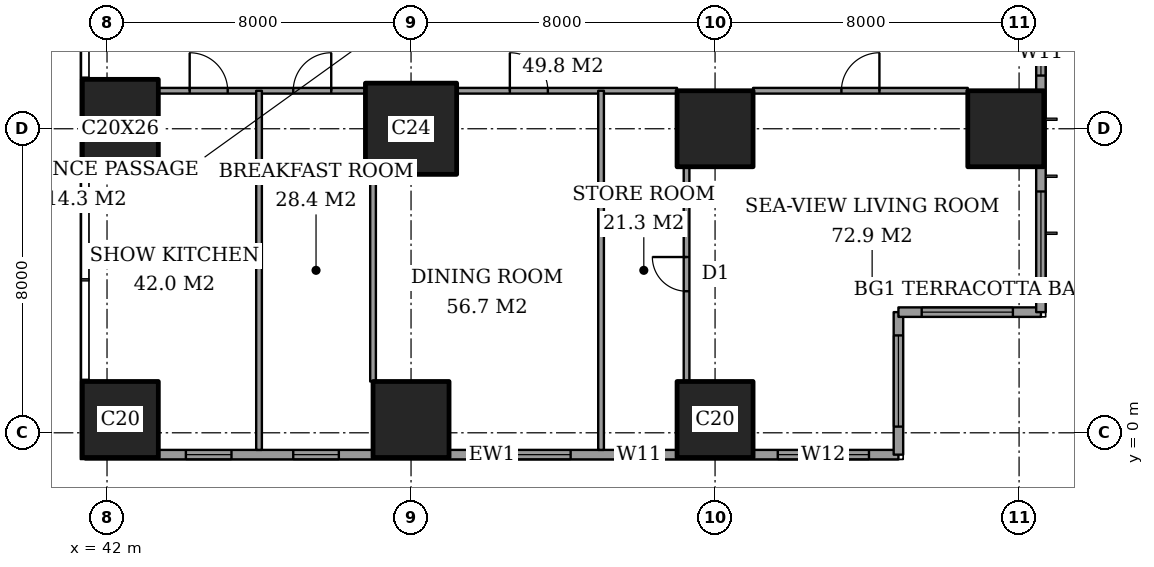
"""IFC4 building model, lengths in metres.
Left out: names, types, materials, properties, quantities, classifications, styles, units other than length and angle.
Written with IfcOpenShell. Run it as: python <this file> out.ifc"""

import sys

from ifc_helpers import new_model, si_unit, direction, frame, frame_2d, origin, origin_2d, place, context, subcontext, project, spatial, rectangle, extrude, element, fill, save


model = new_model("IFC4")
c1 = context("Model", 3, precision=1e-05, world=origin(), true_north=direction((0.0, 1.0)))
c2 = subcontext(c1, "Body", "Model", "MODEL_VIEW")
j1 = project(units=[si_unit("LENGTHUNIT", "METRE"), si_unit("PLANEANGLEUNIT", "RADIAN")], contexts=[c1])
p1 = place(None, origin())
s1 = spatial("IfcSite", under=j1, at=p1, CompositionType="ELEMENT")
p2 = place(p1, origin())
s2 = spatial("IfcBuilding", under=s1, at=p2, CompositionType="ELEMENT")
p3 = place(p2, frame((0.0, 0.0, 153.8)))
s3 = spatial("IfcBuildingStorey", under=s2, at=p3, CompositionType="ELEMENT", Elevation=153.8)
p4 = place(p3, frame((42.35, 0.35, 0.0), z_axis=(0.0, 0.0, 1.0), x_axis=(1.0, 0.0, 0.0)))
e1 = element("IfcColumn", 1, at=p4, inside=s3, PredefinedType="COLUMN", context=c2, shape_type="SweptSolid", body=[
    extrude(rectangle(XDim=2.0, YDim=2.0, at=origin_2d()), origin(), (0.0, 0.0, 1.0), 3.6),
])
p5 = place(p3, frame((42.35, 8.0, 0.0), z_axis=(0.0, 0.0, 1.0), x_axis=(1.0, 0.0, 0.0)))
e2 = element("IfcColumn", 2, at=p5, inside=s3, PredefinedType="COLUMN", context=c2, shape_type="SweptSolid", body=[
    extrude(rectangle(XDim=2.0, YDim=2.6, at=origin_2d()), origin(), (0.0, 0.0, 1.0), 3.6),
])
p6 = place(p3, frame((50.0, 0.35, 0.0), z_axis=(0.0, 0.0, 1.0), x_axis=(1.0, 0.0, 0.0)))
e3 = element("IfcColumn", 3, at=p6, inside=s3, PredefinedType="COLUMN", context=c2, shape_type="SweptSolid", body=[
    extrude(rectangle(XDim=2.0, YDim=2.0, at=origin_2d()), origin(), (0.0, 0.0, 1.0), 3.6),
])
p7 = place(p3, frame((50.0, 8.0, 0.0), z_axis=(0.0, 0.0, 1.0), x_axis=(1.0, 0.0, 0.0)))
e4 = element("IfcColumn", 4, at=p7, inside=s3, PredefinedType="COLUMN", context=c2, shape_type="SweptSolid", body=[
    extrude(rectangle(XDim=2.4, YDim=2.4, at=origin_2d()), origin(), (0.0, 0.0, 1.0), 3.6),
])
for number, where, z_axis, x_axis in (
    (5, (58.0, 0.35, 0.0), (0.0, 0.0, 1.0), (1.0, 0.0, 0.0)),
    (6, (58.0, 8.0, 0.0), (0.0, 0.0, 1.0), (1.0, 0.0, 0.0)),
    (7, (65.65, 8.0, 0.0), (0.0, 0.0, 1.0), (1.0, 0.0, 0.0)),
):
    element("IfcColumn", number, at=place(p3, frame(where, z_axis=z_axis, x_axis=x_axis)), inside=s3, PredefinedType="COLUMN", context=c2, shape_type="SweptSolid", body=[
        extrude(rectangle(XDim=2.0, YDim=2.0, at=origin_2d()), origin(), (0.0, 0.0, 1.0), 3.6),
    ])
p8 = place(p3, frame((41.425, -0.575, 0.0), z_axis=(0.0, 0.0, 1.0), x_axis=(1.0, 0.0, 0.0)))
e8 = element("IfcWall", 8, at=p8, inside=s3, PredefinedType="SOLIDWALL", context=c2, shape_type="SweptSolid", body=[
    extrude(rectangle(XDim=21.4, YDim=0.25, at=frame_2d((10.7, 0.0))), origin(), (0.0, 0.0, 1.0), 3.6),
])
p9 = place(p8, frame((2.65, 0.0, 0.4)))
e9 = element("IfcOpeningElement", 9, at=p9, cuts=e8, PredefinedType="OPENING", context=c2, shape_type="SweptSolid", body=[
    extrude(rectangle(XDim=1.2, YDim=2.2, at=frame_2d((0.6, 1.1))), frame((0.0, 0.135, 0.0), z_axis=(0.0, -1.0, 0.0), x_axis=(1.0, 0.0, 0.0)), (0.0, 0.0, 1.0), 0.27),
])
p10 = place(p8, frame((5.475, 0.0, 0.4)))
e10 = element("IfcOpeningElement", 10, at=p10, cuts=e8, PredefinedType="OPENING", context=c2, shape_type="SweptSolid", body=[
    extrude(rectangle(XDim=1.2, YDim=2.2, at=frame_2d((0.6, 1.1))), frame((0.0, 0.135, 0.0), z_axis=(0.0, -1.0, 0.0), x_axis=(1.0, 0.0, 0.0)), (0.0, 0.0, 1.0), 0.27),
])
p11 = place(p8, frame((10.375, 0.0, 0.4)))
e11 = element("IfcOpeningElement", 11, at=p11, cuts=e8, PredefinedType="OPENING", context=c2, shape_type="SweptSolid", body=[
    extrude(rectangle(XDim=2.4, YDim=2.2, at=frame_2d((1.2, 1.1))), frame((0.0, 0.135, 0.0), z_axis=(0.0, -1.0, 0.0), x_axis=(1.0, 0.0, 0.0)), (0.0, 0.0, 1.0), 0.27),
])
p12 = place(p8, frame((13.975, 0.0, 0.4)))
e12 = element("IfcOpeningElement", 12, at=p12, cuts=e8, PredefinedType="OPENING", context=c2, shape_type="SweptSolid", body=[
    extrude(rectangle(XDim=1.2, YDim=2.2, at=frame_2d((0.6, 1.1))), frame((0.0, 0.135, 0.0), z_axis=(0.0, -1.0, 0.0), x_axis=(1.0, 0.0, 0.0)), (0.0, 0.0, 1.0), 0.27),
])
p13 = place(p8, frame((18.225, 0.0, 0.4)))
e13 = element("IfcOpeningElement", 13, at=p13, cuts=e8, PredefinedType="OPENING", context=c2, shape_type="SweptSolid", body=[
    extrude(rectangle(XDim=2.4, YDim=2.2, at=frame_2d((1.2, 1.1))), frame((0.0, 0.135, 0.0), z_axis=(0.0, -1.0, 0.0), x_axis=(1.0, 0.0, 0.0)), (0.0, 0.0, 1.0), 0.27),
])
p14 = place(p3, frame((62.825, -0.575, 0.0), z_axis=(0.0, 0.0, 1.0), x_axis=(0.0, 1.0, 0.0)))
e14 = element("IfcWall", 14, at=p14, inside=s3, PredefinedType="SOLIDWALL", context=c2, shape_type="SweptSolid", body=[
    extrude(rectangle(XDim=3.75, YDim=0.25, at=frame_2d((1.875, 0.0))), origin(), (0.0, 0.0, 1.0), 3.6),
])
p15 = place(p14, frame((0.738, 0.0, 0.4)))
e15 = element("IfcOpeningElement", 15, at=p15, cuts=e14, PredefinedType="OPENING", context=c2, shape_type="SweptSolid", body=[
    extrude(rectangle(XDim=2.4, YDim=2.2, at=frame_2d((1.2, 1.1))), frame((0.0, 0.135, 0.0), z_axis=(0.0, -1.0, 0.0), x_axis=(1.0, 0.0, 0.0)), (0.0, 0.0, 1.0), 0.27),
])
p16 = place(p3, frame((62.825, 3.175, 0.0), z_axis=(0.0, 0.0, 1.0), x_axis=(1.0, 0.0, 0.0)))
e16 = element("IfcWall", 16, at=p16, inside=s3, PredefinedType="SOLIDWALL", context=c2, shape_type="SweptSolid", body=[
    extrude(rectangle(XDim=3.75, YDim=0.25, at=frame_2d((1.875, 0.0))), origin(), (0.0, 0.0, 1.0), 3.6),
])
p17 = place(p16, frame((0.613, 0.0, 0.4)))
e17 = element("IfcOpeningElement", 17, at=p17, cuts=e16, PredefinedType="OPENING", context=c2, shape_type="SweptSolid", body=[
    extrude(rectangle(XDim=2.4, YDim=2.2, at=frame_2d((1.2, 1.1))), frame((0.0, 0.135, 0.0), z_axis=(0.0, -1.0, 0.0), x_axis=(1.0, 0.0, 0.0)), (0.0, 0.0, 1.0), 0.27),
])
p18 = place(p3, frame((66.575, 3.175, 0.0), z_axis=(0.0, 0.0, 1.0), x_axis=(0.0, 1.0, 0.0)))
e18 = element("IfcWall", 18, at=p18, inside=s3, PredefinedType="SOLIDWALL", context=c2, shape_type="SweptSolid", body=[
    extrude(rectangle(XDim=41.65, YDim=0.25, at=frame_2d((20.825, 0.0))), origin(), (0.0, 0.0, 1.0), 3.6),
])
p19 = place(p18, frame((0.775, 0.0, 0.4)))
e19 = element("IfcOpeningElement", 19, at=p19, cuts=e18, PredefinedType="OPENING", context=c2, shape_type="SweptSolid", body=[
    extrude(rectangle(XDim=2.4, YDim=2.2, at=frame_2d((1.2, 1.1))), frame((0.0, 0.135, 0.0), z_axis=(0.0, -1.0, 0.0), x_axis=(1.0, 0.0, 0.0)), (0.0, 0.0, 1.0), 0.27),
])
p20 = place(p18, frame((6.225, 0.0, 0.4)))
e20 = element("IfcOpeningElement", 20, at=p20, cuts=e18, PredefinedType="OPENING", context=c2, shape_type="SweptSolid", body=[
    extrude(rectangle(XDim=1.2, YDim=2.2, at=frame_2d((0.6, 1.1))), frame((0.0, 0.135, 0.0), z_axis=(0.0, -1.0, 0.0), x_axis=(1.0, 0.0, 0.0)), (0.0, 0.0, 1.0), 0.27),
])
p21 = place(p18, frame((8.475, 0.0, 0.4)))
e21 = element("IfcOpeningElement", 21, at=p21, cuts=e18, PredefinedType="OPENING", context=c2, shape_type="SweptSolid", body=[
    extrude(rectangle(XDim=2.4, YDim=2.2, at=frame_2d((1.2, 1.1))), frame((0.0, 0.135, 0.0), z_axis=(0.0, -1.0, 0.0), x_axis=(1.0, 0.0, 0.0)), (0.0, 0.0, 1.0), 0.27),
])
p22 = place(p18, frame((15.775, 0.0, 0.4)))
e22 = element("IfcOpeningElement", 22, at=p22, cuts=e18, PredefinedType="OPENING", context=c2, shape_type="SweptSolid", body=[
    extrude(rectangle(XDim=2.4, YDim=2.2, at=frame_2d((1.2, 1.1))), frame((0.0, 0.135, 0.0), z_axis=(0.0, -1.0, 0.0), x_axis=(1.0, 0.0, 0.0)), (0.0, 0.0, 1.0), 0.27),
])
p23 = place(p18, frame((23.475, 0.0, 0.4)))
e23 = element("IfcOpeningElement", 23, at=p23, cuts=e18, PredefinedType="OPENING", context=c2, shape_type="SweptSolid", body=[
    extrude(rectangle(XDim=2.4, YDim=2.2, at=frame_2d((1.2, 1.1))), frame((0.0, 0.135, 0.0), z_axis=(0.0, -1.0, 0.0), x_axis=(1.0, 0.0, 0.0)), (0.0, 0.0, 1.0), 0.27),
])
p24 = place(p18, frame((30.975, 0.0, 0.4)))
e24 = element("IfcOpeningElement", 24, at=p24, cuts=e18, PredefinedType="OPENING", context=c2, shape_type="SweptSolid", body=[
    extrude(rectangle(XDim=2.4, YDim=2.2, at=frame_2d((1.2, 1.1))), frame((0.0, 0.135, 0.0), z_axis=(0.0, -1.0, 0.0), x_axis=(1.0, 0.0, 0.0)), (0.0, 0.0, 1.0), 0.27),
])
p25 = place(p18, frame((34.5, 0.0, 0.4)))
e25 = element("IfcOpeningElement", 25, at=p25, cuts=e18, PredefinedType="OPENING", context=c2, shape_type="SweptSolid", body=[
    extrude(rectangle(XDim=1.2, YDim=2.2, at=frame_2d((0.6, 1.1))), frame((0.0, 0.135, 0.0), z_axis=(0.0, -1.0, 0.0), x_axis=(1.0, 0.0, 0.0)), (0.0, 0.0, 1.0), 0.27),
])
p26 = place(p18, frame((38.475, 0.0, 0.4)))
e26 = element("IfcOpeningElement", 26, at=p26, cuts=e18, PredefinedType="OPENING", context=c2, shape_type="SweptSolid", body=[
    extrude(rectangle(XDim=2.4, YDim=2.2, at=frame_2d((1.2, 1.1))), frame((0.0, 0.135, 0.0), z_axis=(0.0, -1.0, 0.0), x_axis=(1.0, 0.0, 0.0)), (0.0, 0.0, 1.0), 0.27),
])
p27 = place(p3, frame((43.35, 9.0, 0.0), z_axis=(0.0, 0.0, 1.0), x_axis=(1.0, 0.0, 0.0)))
e27 = element("IfcWall", 27, at=p27, inside=s3, PredefinedType="PARTITIONING", context=c2, shape_type="SweptSolid", body=[
    extrude(rectangle(XDim=5.45, YDim=0.15, at=frame_2d((2.725, 0.0))), origin(), (0.0, 0.0, 1.0), 3.35),
])
p28 = place(p27, frame((3.55, 0.0, 0.0)))
e28 = element("IfcOpeningElement", 28, at=p28, cuts=e27, PredefinedType="OPENING", context=c2, shape_type="SweptSolid", body=[
    extrude(rectangle(XDim=1.0, YDim=2.1, at=frame_2d((0.5, 1.05))), frame((0.0, 0.085, 0.0), z_axis=(0.0, -1.0, 0.0), x_axis=(1.0, 0.0, 0.0)), (0.0, 0.0, 1.0), 0.17),
])
p29 = place(p27, frame((0.825, 0.0, 0.0)))
e29 = element("IfcOpeningElement", 29, at=p29, cuts=e27, PredefinedType="OPENING", context=c2, shape_type="SweptSolid", body=[
    extrude(rectangle(XDim=1.0, YDim=2.1, at=frame_2d((0.5, 1.05))), frame((0.0, 0.085, 0.0), z_axis=(0.0, -1.0, 0.0), x_axis=(1.0, 0.0, 0.0)), (0.0, 0.0, 1.0), 0.17),
])
p30 = place(p3, frame((51.2, 9.0, 0.0), z_axis=(0.0, 0.0, 1.0), x_axis=(1.0, 0.0, 0.0)))
e30 = element("IfcWall", 30, at=p30, inside=s3, PredefinedType="PARTITIONING", context=c2, shape_type="SweptSolid", body=[
    extrude(rectangle(XDim=5.8, YDim=0.15, at=frame_2d((2.9, 0.0))), origin(), (0.0, 0.0, 1.0), 3.35),
])
p31 = place(p30, frame((1.4, 0.0, 0.0)))
e31 = element("IfcOpeningElement", 31, at=p31, cuts=e30, PredefinedType="OPENING", context=c2, shape_type="SweptSolid", body=[
    extrude(rectangle(XDim=1.0, YDim=2.1, at=frame_2d((0.5, 1.05))), frame((0.0, 0.085, 0.0), z_axis=(0.0, -1.0, 0.0), x_axis=(1.0, 0.0, 0.0)), (0.0, 0.0, 1.0), 0.17),
])
p32 = place(p3, frame((59.0, 9.0, 0.0), z_axis=(0.0, 0.0, 1.0), x_axis=(1.0, 0.0, 0.0)))
e32 = element("IfcWall", 32, at=p32, inside=s3, PredefinedType="PARTITIONING", context=c2, shape_type="SweptSolid", body=[
    extrude(rectangle(XDim=5.65, YDim=0.15, at=frame_2d((2.825, 0.0))), origin(), (0.0, 0.0, 1.0), 3.35),
])
p33 = place(p32, frame((2.325, 0.0, 0.0)))
e33 = element("IfcOpeningElement", 33, at=p33, cuts=e32, PredefinedType="OPENING", context=c2, shape_type="SweptSolid", body=[
    extrude(rectangle(XDim=1.0, YDim=2.1, at=frame_2d((0.5, 1.05))), frame((0.0, 0.085, 0.0), z_axis=(0.0, -1.0, 0.0), x_axis=(1.0, 0.0, 0.0)), (0.0, 0.0, 1.0), 0.17),
])
p34 = place(p3, frame((46.0, -0.45, 0.0), z_axis=(0.0, 0.0, 1.0), x_axis=(0.0, 1.0, 0.0)))
e34 = element("IfcWall", 34, at=p34, inside=s3, PredefinedType="PARTITIONING", context=c2, shape_type="SweptSolid", body=[
    extrude(rectangle(XDim=9.45, YDim=0.15, at=frame_2d((4.725, 0.0))), origin(), (0.0, 0.0, 1.0), 3.35),
])
p35 = place(p3, frame((49.0, 1.35, 0.0), z_axis=(0.0, 0.0, 1.0), x_axis=(0.0, 1.0, 0.0)))
e35 = element("IfcWall", 35, at=p35, inside=s3, PredefinedType="PARTITIONING", context=c2, shape_type="SweptSolid", body=[
    extrude(rectangle(XDim=5.45, YDim=0.15, at=frame_2d((2.725, 0.0))), origin(), (0.0, 0.0, 1.0), 3.35),
])
p36 = place(p3, frame((55.0, -0.45, 0.0), z_axis=(0.0, 0.0, 1.0), x_axis=(0.0, 1.0, 0.0)))
e36 = element("IfcWall", 36, at=p36, inside=s3, PredefinedType="PARTITIONING", context=c2, shape_type="SweptSolid", body=[
    extrude(rectangle(XDim=9.45, YDim=0.15, at=frame_2d((4.725, 0.0))), origin(), (0.0, 0.0, 1.0), 3.35),
])
p37 = place(p3, frame((57.25, 1.35, 0.0), z_axis=(0.0, 0.0, 1.0), x_axis=(0.0, 1.0, 0.0)))
e37 = element("IfcWall", 37, at=p37, inside=s3, PredefinedType="PARTITIONING", context=c2, shape_type="SweptSolid", body=[
    extrude(rectangle(XDim=5.65, YDim=0.15, at=frame_2d((2.825, 0.0))), origin(), (0.0, 0.0, 1.0), 3.35),
])
p38 = place(p37, frame((2.375, 0.0, 0.0)))
e38 = element("IfcOpeningElement", 38, at=p38, cuts=e37, PredefinedType="OPENING", context=c2, shape_type="SweptSolid", body=[
    extrude(rectangle(XDim=0.9, YDim=2.1, at=frame_2d((0.45, 1.05))), frame((0.0, 0.085, 0.0), z_axis=(0.0, -1.0, 0.0), x_axis=(1.0, 0.0, 0.0)), (0.0, 0.0, 1.0), 0.17),
])
p39 = place(p9, origin())
e39 = element("IfcWindow", 39, at=p39, inside=s3, PartitioningType="SINGLE_PANEL", PredefinedType="WINDOW", context=c2, shape_type="SweptSolid", body=[
    extrude(rectangle(XDim=1.2, YDim=2.2, at=frame_2d((0.6, 1.1))), frame((0.0, 0.03, 0.0), z_axis=(0.0, -1.0, 0.0), x_axis=(1.0, 0.0, 0.0)), (0.0, 0.0, 1.0), 0.06),
])
fill(e9, e39)
p40 = place(p10, origin())
e40 = element("IfcWindow", 40, at=p40, inside=s3, PartitioningType="SINGLE_PANEL", PredefinedType="WINDOW", context=c2, shape_type="SweptSolid", body=[
    extrude(rectangle(XDim=1.2, YDim=2.2, at=frame_2d((0.6, 1.1))), frame((0.0, 0.03, 0.0), z_axis=(0.0, -1.0, 0.0), x_axis=(1.0, 0.0, 0.0)), (0.0, 0.0, 1.0), 0.06),
])
fill(e10, e40)
p41 = place(p11, origin())
e41 = element("IfcWindow", 41, at=p41, inside=s3, PartitioningType="SINGLE_PANEL", PredefinedType="WINDOW", context=c2, shape_type="SweptSolid", body=[
    extrude(rectangle(XDim=2.4, YDim=2.2, at=frame_2d((1.2, 1.1))), frame((0.0, 0.03, 0.0), z_axis=(0.0, -1.0, 0.0), x_axis=(1.0, 0.0, 0.0)), (0.0, 0.0, 1.0), 0.06),
])
fill(e11, e41)
p42 = place(p12, origin())
e42 = element("IfcWindow", 42, at=p42, inside=s3, PartitioningType="SINGLE_PANEL", PredefinedType="WINDOW", context=c2, shape_type="SweptSolid", body=[
    extrude(rectangle(XDim=1.2, YDim=2.2, at=frame_2d((0.6, 1.1))), frame((0.0, 0.03, 0.0), z_axis=(0.0, -1.0, 0.0), x_axis=(1.0, 0.0, 0.0)), (0.0, 0.0, 1.0), 0.06),
])
fill(e12, e42)
p43 = place(p13, origin())
e43 = element("IfcWindow", 43, at=p43, inside=s3, PartitioningType="SINGLE_PANEL", PredefinedType="WINDOW", context=c2, shape_type="SweptSolid", body=[
    extrude(rectangle(XDim=2.4, YDim=2.2, at=frame_2d((1.2, 1.1))), frame((0.0, 0.03, 0.0), z_axis=(0.0, -1.0, 0.0), x_axis=(1.0, 0.0, 0.0)), (0.0, 0.0, 1.0), 0.06),
])
fill(e13, e43)
p44 = place(p15, origin())
e44 = element("IfcWindow", 44, at=p44, inside=s3, PartitioningType="SINGLE_PANEL", PredefinedType="WINDOW", context=c2, shape_type="SweptSolid", body=[
    extrude(rectangle(XDim=2.4, YDim=2.2, at=frame_2d((1.2, 1.1))), frame((0.0, 0.03, 0.0), z_axis=(0.0, -1.0, 0.0), x_axis=(1.0, 0.0, 0.0)), (0.0, 0.0, 1.0), 0.06),
])
fill(e15, e44)
p45 = place(p17, origin())
e45 = element("IfcWindow", 45, at=p45, inside=s3, PartitioningType="SINGLE_PANEL", PredefinedType="WINDOW", context=c2, shape_type="SweptSolid", body=[
    extrude(rectangle(XDim=2.4, YDim=2.2, at=frame_2d((1.2, 1.1))), frame((0.0, 0.03, 0.0), z_axis=(0.0, -1.0, 0.0), x_axis=(1.0, 0.0, 0.0)), (0.0, 0.0, 1.0), 0.06),
])
fill(e17, e45)
p46 = place(p19, origin())
e46 = element("IfcWindow", 46, at=p46, inside=s3, PartitioningType="SINGLE_PANEL", PredefinedType="WINDOW", context=c2, shape_type="SweptSolid", body=[
    extrude(rectangle(XDim=2.4, YDim=2.2, at=frame_2d((1.2, 1.1))), frame((0.0, 0.03, 0.0), z_axis=(0.0, -1.0, 0.0), x_axis=(1.0, 0.0, 0.0)), (0.0, 0.0, 1.0), 0.06),
])
fill(e19, e46)
p47 = place(p20, origin())
e47 = element("IfcWindow", 47, at=p47, inside=s3, PartitioningType="SINGLE_PANEL", PredefinedType="WINDOW", context=c2, shape_type="SweptSolid", body=[
    extrude(rectangle(XDim=1.2, YDim=2.2, at=frame_2d((0.6, 1.1))), frame((0.0, 0.03, 0.0), z_axis=(0.0, -1.0, 0.0), x_axis=(1.0, 0.0, 0.0)), (0.0, 0.0, 1.0), 0.06),
])
fill(e20, e47)
p48 = place(p33, origin())
e48 = element("IfcDoor", 48, at=p48, inside=s3, OperationType="SINGLE_SWING_LEFT", PredefinedType="DOOR", context=c2, shape_type="SweptSolid", body=[
    extrude(rectangle(XDim=1.0, YDim=2.1, at=frame_2d((0.5, 1.05))), frame((0.0, 0.025, 0.0), z_axis=(0.0, -1.0, 0.0), x_axis=(1.0, 0.0, 0.0)), (0.0, 0.0, 1.0), 0.05),
])
fill(e33, e48)
p49 = place(p38, origin())
e49 = element("IfcDoor", 49, at=p49, inside=s3, OperationType="SINGLE_SWING_LEFT", PredefinedType="DOOR", context=c2, shape_type="SweptSolid", body=[
    extrude(rectangle(XDim=0.9, YDim=2.1, at=frame_2d((0.45, 1.05))), frame((0.0, 0.025, 0.0), z_axis=(0.0, -1.0, 0.0), x_axis=(1.0, 0.0, 0.0)), (0.0, 0.0, 1.0), 0.05),
])
fill(e38, e49)
p50 = place(p31, origin())
e50 = element("IfcDoor", 50, at=p50, inside=s3, OperationType="SINGLE_SWING_RIGHT", PredefinedType="DOOR", context=c2, shape_type="SweptSolid", body=[
    extrude(rectangle(XDim=1.0, YDim=2.1, at=frame_2d((0.5, 1.05))), frame((0.0, 0.025, 0.0), z_axis=(0.0, -1.0, 0.0), x_axis=(1.0, 0.0, 0.0)), (0.0, 0.0, 1.0), 0.05),
])
fill(e31, e50)
p51 = place(p28, origin())
e51 = element("IfcDoor", 51, at=p51, inside=s3, OperationType="SINGLE_SWING_LEFT", PredefinedType="DOOR", context=c2, shape_type="SweptSolid", body=[
    extrude(rectangle(XDim=1.0, YDim=2.1, at=frame_2d((0.5, 1.05))), frame((0.0, 0.025, 0.0), z_axis=(0.0, -1.0, 0.0), x_axis=(1.0, 0.0, 0.0)), (0.0, 0.0, 1.0), 0.05),
])
fill(e28, e51)
p52 = place(p29, origin())
e52 = element("IfcDoor", 52, at=p52, inside=s3, OperationType="SINGLE_SWING_RIGHT", PredefinedType="DOOR", context=c2, shape_type="SweptSolid", body=[
    extrude(rectangle(XDim=1.0, YDim=2.1, at=frame_2d((0.5, 1.05))), frame((0.0, 0.025, 0.0), z_axis=(0.0, -1.0, 0.0), x_axis=(1.0, 0.0, 0.0)), (0.0, 0.0, 1.0), 0.05),
])
fill(e29, e52)
save(model, sys.argv[1])
